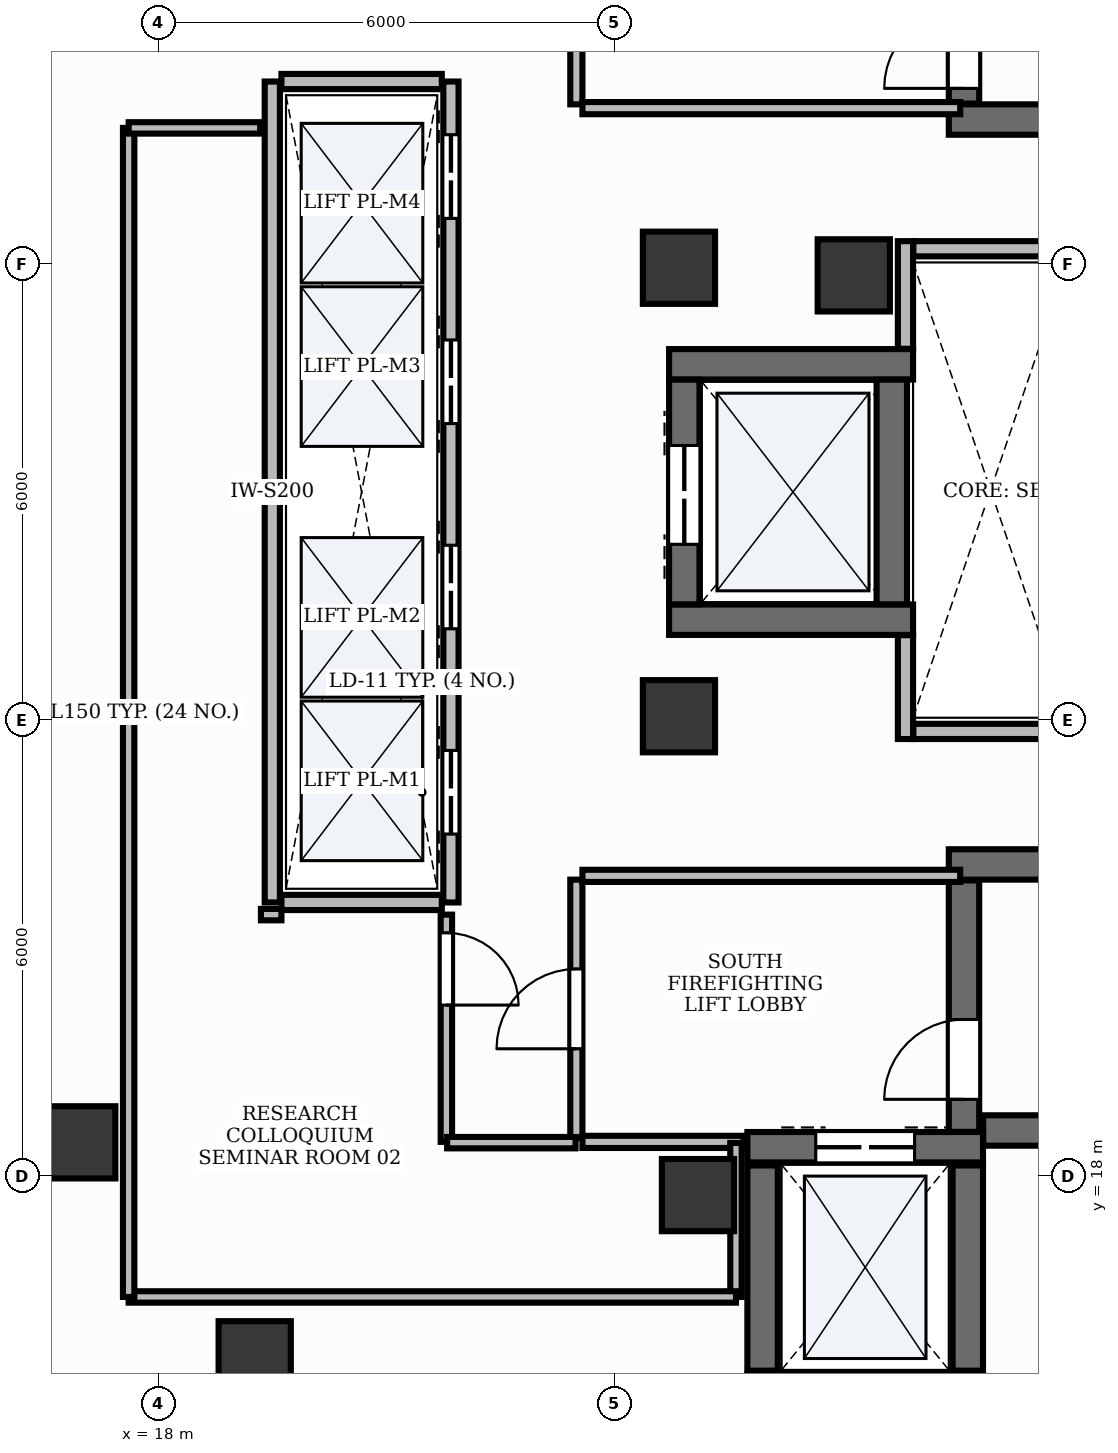
"""IFC4 building model, lengths in metres.
Left out: names, types, materials, properties, quantities, classifications, styles, units other than length and angle.
Written with IfcOpenShell. Run it as: python <this file> out.ifc"""

import sys

from ifc_helpers import new_model, si_unit, direction, frame, frame_2d, origin, origin_2d, place, context, subcontext, project, spatial, rectangle, extrude, element, fill, save


model = new_model("IFC4")
c1 = context("Model", 3, precision=1e-05, world=origin(), true_north=direction((0.0, 1.0)))
c2 = subcontext(c1, "Body", "Model", "MODEL_VIEW")
j1 = project(units=[si_unit("LENGTHUNIT", "METRE"), si_unit("PLANEANGLEUNIT", "RADIAN")], contexts=[c1])
p1 = place(None, origin())
s1 = spatial("IfcSite", under=j1, at=p1, CompositionType="ELEMENT")
p2 = place(p1, origin())
s2 = spatial("IfcBuilding", under=s1, at=p2, CompositionType="ELEMENT")
p3 = place(p2, frame((0.0, 0.0, 218.4)))
s3 = spatial("IfcBuildingStorey", under=s2, at=p3, CompositionType="ELEMENT", Elevation=218.4)
p4 = place(p3, frame((28.4, 31.9, 0.0), z_axis=(0.0, 0.0, 1.0), x_axis=(1.0, 0.0, 0.0)))
e1 = element("IfcWall", 1, at=p4, inside=s3, PredefinedType="SHEAR", context=c2, shape_type="SweptSolid", body=[
    extrude(rectangle(XDim=8.65, YDim=0.4, at=frame_2d((4.325, 0.0))), origin(), (0.0, 0.0, 1.0), 3.9),
])
p5 = place(p3, frame((28.6, 32.11, 0.0), z_axis=(0.0, 0.0, 1.0), x_axis=(0.0, 1.0, 0.0)))
e2 = element("IfcWall", 2, at=p5, inside=s3, PredefinedType="SHEAR", context=c2, shape_type="SweptSolid", body=[
    extrude(rectangle(XDim=3.308, YDim=0.4, at=frame_2d((1.654, 0.0))), origin(), (0.0, 0.0, 1.0), 3.9),
])
p6 = place(p5, frame((0.2, 0.0, 0.0)))
e3 = element("IfcOpeningElement", 3, at=p6, cuts=e2, PredefinedType="OPENING", context=c2, shape_type="SweptSolid", body=[
    extrude(rectangle(XDim=1.05, YDim=2.15, at=frame_2d((0.525, 1.075))), frame((0.0, 0.215, 0.0), z_axis=(0.0, -1.0, 0.0), x_axis=(1.0, 0.0, 0.0)), (0.0, 0.0, 1.0), 0.43),
])
p7 = place(p3, frame((28.852, 18.6, 0.0), z_axis=(0.0, 0.0, 1.0), x_axis=(1.0, 0.0, 0.0)))
e4 = element("IfcWall", 4, at=p7, inside=s3, PredefinedType="SHEAR", context=c2, shape_type="SweptSolid", body=[
    extrude(rectangle(XDim=8.198, YDim=0.4, at=frame_2d((4.099, 0.0))), origin(), (0.0, 0.0, 1.0), 3.9),
])
p8 = place(p3, frame((28.4, 22.1, 0.0), z_axis=(0.0, 0.0, 1.0), x_axis=(1.0, 0.0, 0.0)))
e5 = element("IfcWall", 5, at=p8, inside=s3, PredefinedType="SHEAR", context=c2, shape_type="SweptSolid", body=[
    extrude(rectangle(XDim=8.65, YDim=0.4, at=frame_2d((4.325, 0.0))), origin(), (0.0, 0.0, 1.0), 3.9),
])
p9 = place(p3, frame((28.6, 18.582, 0.0), z_axis=(0.0, 0.0, 1.0), x_axis=(0.0, 1.0, 0.0)))
e6 = element("IfcWall", 6, at=p9, inside=s3, PredefinedType="SHEAR", context=c2, shape_type="SweptSolid", body=[
    extrude(rectangle(XDim=3.308, YDim=0.4, at=frame_2d((1.654, 0.0))), origin(), (0.0, 0.0, 1.0), 3.9),
])
p10 = place(p9, frame((0.428, 0.0, 0.0)))
e7 = element("IfcOpeningElement", 7, at=p10, cuts=e6, PredefinedType="OPENING", context=c2, shape_type="SweptSolid", body=[
    extrude(rectangle(XDim=1.05, YDim=2.15, at=frame_2d((0.525, 1.075))), frame((0.0, 0.215, 0.0), z_axis=(0.0, -1.0, 0.0), x_axis=(1.0, 0.0, 0.0)), (0.0, 0.0, 1.0), 0.43),
])
p11 = place(p3, frame((25.75, 18.38, 0.0), z_axis=(0.0, 0.0, 1.0), x_axis=(1.0, 0.0, 0.0)))
e8 = element("IfcWall", 8, at=p11, inside=s3, PredefinedType="SHEAR", context=c2, shape_type="SweptSolid", body=[
    extrude(rectangle(XDim=3.1, YDim=0.4, at=frame_2d((1.55, 0.0))), origin(), (0.0, 0.0, 1.0), 3.9),
])
p12 = place(p11, frame((0.9, 0.0, 0.0)))
e9 = element("IfcOpeningElement", 9, at=p12, cuts=e8, PredefinedType="OPENING", context=c2, shape_type="SweptSolid", body=[
    extrude(rectangle(XDim=1.3, YDim=2.2, at=frame_2d((0.65, 1.1))), frame((0.0, 0.215, 0.0), z_axis=(0.0, -1.0, 0.0), x_axis=(1.0, 0.0, 0.0)), (0.0, 0.0, 1.0), 0.43),
])
for number, where, z_axis, x_axis in (
    (10, (25.95, 15.44, 0.0), (0.0, 0.0, 1.0), (0.0, 1.0, 0.0)),
    (11, (28.65, 15.44, 0.0), (0.0, 0.0, 1.0), (0.0, 1.0, 0.0)),
):
    element("IfcWall", number, at=place(p3, frame(where, z_axis=z_axis, x_axis=x_axis)), inside=s3, PredefinedType="SHEAR", context=c2, shape_type="SweptSolid", body=[
        extrude(rectangle(XDim=2.7, YDim=0.4, at=frame_2d((1.35, 0.0))), origin(), (0.0, 0.0, 1.0), 3.9),
    ])
for number, where, z_axis, x_axis in (
    (12, (24.72, 28.68, 0.0), (0.0, 0.0, 1.0), (1.0, 0.0, 0.0)),
    (13, (24.72, 25.32, 0.0), (0.0, 0.0, 1.0), (1.0, 0.0, 0.0)),
):
    element("IfcWall", number, at=place(p3, frame(where, z_axis=z_axis, x_axis=x_axis)), inside=s3, PredefinedType="SHEAR", context=c2, shape_type="SweptSolid", body=[
        extrude(rectangle(XDim=3.21, YDim=0.4, at=frame_2d((1.605, 0.0))), origin(), (0.0, 0.0, 1.0), 3.9),
    ])
p13 = place(p3, frame((24.92, 25.522, 0.0), z_axis=(0.0, 0.0, 1.0), x_axis=(0.0, 1.0, 0.0)))
e14 = element("IfcWall", 14, at=p13, inside=s3, PredefinedType="SHEAR", context=c2, shape_type="SweptSolid", body=[
    extrude(rectangle(XDim=2.956, YDim=0.4, at=frame_2d((1.478, 0.0))), origin(), (0.0, 0.0, 1.0), 3.9),
])
p14 = place(p13, frame((0.79, 0.0, 0.0)))
e15 = element("IfcOpeningElement", 15, at=p14, cuts=e14, PredefinedType="OPENING", context=c2, shape_type="SweptSolid", body=[
    extrude(rectangle(XDim=1.3, YDim=2.2, at=frame_2d((0.65, 1.1))), frame((0.0, 0.215, 0.0), z_axis=(0.0, -1.0, 0.0), x_axis=(1.0, 0.0, 0.0)), (0.0, 0.0, 1.0), 0.43),
])
p15 = place(p3, frame((27.65, 25.522, 0.0), z_axis=(0.0, 0.0, 1.0), x_axis=(0.0, 1.0, 0.0)))
e16 = element("IfcWall", 16, at=p15, inside=s3, PredefinedType="SHEAR", context=c2, shape_type="SweptSolid", body=[
    extrude(rectangle(XDim=2.956, YDim=0.4, at=frame_2d((1.478, 0.0))), origin(), (0.0, 0.0, 1.0), 3.9),
])
for number, where, z_axis, x_axis in (
    (17, (24.85, 29.95, -0.0), (0.0, 0.0, 1.0), (1.0, 0.0, 0.0)),
    (18, (27.15, 29.85, -0.0), (0.0, 0.0, 1.0), (1.0, 0.0, 0.0)),
    (19, (24.85, 24.05, -0.0), (0.0, 0.0, 1.0), (1.0, 0.0, 0.0)),
    (20, (25.1, 17.75, -0.0), (0.0, 0.0, 1.0), (1.0, 0.0, 0.0)),
):
    element("IfcColumn", number, at=place(p3, frame(where, z_axis=z_axis, x_axis=x_axis)), inside=s3, PredefinedType="PILASTER", context=c2, shape_type="SweptSolid", body=[
        extrude(rectangle(XDim=0.95, YDim=0.95, at=origin_2d()), origin(), (0.0, 0.0, 1.0), 3.901),
    ])
for number, where, z_axis, x_axis in (
    (21, (16.96, 18.444, -0.0), (0.0, 0.0, 1.0), (1.0, 0.0, 0.0)),
    (22, (19.268, 15.616, -0.0), (0.0, 0.0, 1.0), (1.0, 0.0, 0.0)),
):
    element("IfcColumn", number, at=place(p3, frame(where, z_axis=z_axis, x_axis=x_axis)), inside=s3, PredefinedType="COLUMN", context=c2, shape_type="SweptSolid", body=[
        extrude(rectangle(XDim=0.95, YDim=0.95, at=origin_2d()), origin(), (0.0, 0.0, 1.0), 3.901),
    ])
p16 = place(p3, frame((19.5, 21.6, 0.0), z_axis=(0.0, 0.0, 1.0), x_axis=(0.0, 1.0, 0.0)))
e23 = element("IfcWall", 23, at=p16, inside=s3, PredefinedType="PARTITIONING", context=c2, shape_type="SweptSolid", body=[
    extrude(rectangle(XDim=10.8, YDim=0.2, at=frame_2d((5.4, 0.0))), origin(), (0.0, 0.0, 1.0), 2.91),
])
p17 = place(p3, frame((21.85, 21.6, 0.0), z_axis=(0.0, 0.0, 1.0), x_axis=(0.0, 1.0, 0.0)))
e24 = element("IfcWall", 24, at=p17, inside=s3, PredefinedType="PARTITIONING", context=c2, shape_type="SweptSolid", body=[
    extrude(rectangle(XDim=10.8, YDim=0.2, at=frame_2d((5.4, 0.0))), origin(), (0.0, 0.0, 1.0), 2.91),
])
p18 = place(p17, frame((0.9, 0.0, 0.0)))
e25 = element("IfcOpeningElement", 25, at=p18, cuts=e24, PredefinedType="OPENING", context=c2, shape_type="SweptSolid", body=[
    extrude(rectangle(XDim=1.1, YDim=2.2, at=frame_2d((0.55, 1.1))), frame((0.0, 0.115, 0.0), z_axis=(0.0, -1.0, 0.0), x_axis=(1.0, 0.0, 0.0)), (0.0, 0.0, 1.0), 0.23),
])
p19 = place(p17, frame((3.6, 0.0, 0.0)))
e26 = element("IfcOpeningElement", 26, at=p19, cuts=e24, PredefinedType="OPENING", context=c2, shape_type="SweptSolid", body=[
    extrude(rectangle(XDim=1.1, YDim=2.2, at=frame_2d((0.55, 1.1))), frame((0.0, 0.115, 0.0), z_axis=(0.0, -1.0, 0.0), x_axis=(1.0, 0.0, 0.0)), (0.0, 0.0, 1.0), 0.23),
])
p20 = place(p17, frame((6.3, 0.0, 0.0)))
e27 = element("IfcOpeningElement", 27, at=p20, cuts=e24, PredefinedType="OPENING", context=c2, shape_type="SweptSolid", body=[
    extrude(rectangle(XDim=1.1, YDim=2.2, at=frame_2d((0.55, 1.1))), frame((0.0, 0.115, 0.0), z_axis=(0.0, -1.0, 0.0), x_axis=(1.0, 0.0, 0.0)), (0.0, 0.0, 1.0), 0.23),
])
p21 = place(p17, frame((9.0, 0.0, 0.0)))
e28 = element("IfcOpeningElement", 28, at=p21, cuts=e24, PredefinedType="OPENING", context=c2, shape_type="SweptSolid", body=[
    extrude(rectangle(XDim=1.1, YDim=2.2, at=frame_2d((0.55, 1.1))), frame((0.0, 0.115, 0.0), z_axis=(0.0, -1.0, 0.0), x_axis=(1.0, 0.0, 0.0)), (0.0, 0.0, 1.0), 0.23),
])
for number, where, z_axis, x_axis in (
    (29, (19.62, 21.6, 0.0), (0.0, 0.0, 1.0), (1.0, 0.0, 0.0)),
    (30, (19.62, 32.4, 0.0), (0.0, 0.0, 1.0), (1.0, 0.0, 0.0)),
):
    element("IfcWall", number, at=place(p3, frame(where, z_axis=z_axis, x_axis=x_axis)), inside=s3, PredefinedType="PARTITIONING", context=c2, shape_type="SweptSolid", body=[
        extrude(rectangle(XDim=2.11, YDim=0.2, at=frame_2d((1.055, 0.0))), origin(), (0.0, 0.0, 1.0), 2.91),
    ])
p22 = place(p3, frame((27.83, 23.75, 0.0), z_axis=(0.0, 0.0, 1.0), x_axis=(0.0, 1.0, 0.0)))
e31 = element("IfcWall", 31, at=p22, inside=s3, PredefinedType="PARTITIONING", context=c2, shape_type="SweptSolid", body=[
    extrude(rectangle(XDim=1.366, YDim=0.2, at=frame_2d((0.683, 0.0))), origin(), (0.0, 0.0, 1.0), 2.91),
])
p23 = place(p3, frame((27.83, 28.884, 0.0), z_axis=(0.0, 0.0, 1.0), x_axis=(0.0, 1.0, 0.0)))
e32 = element("IfcWall", 32, at=p23, inside=s3, PredefinedType="PARTITIONING", context=c2, shape_type="SweptSolid", body=[
    extrude(rectangle(XDim=1.416, YDim=0.2, at=frame_2d((0.708, 0.0))), origin(), (0.0, 0.0, 1.0), 2.91),
])
for number, where, z_axis, x_axis in (
    (33, (27.934, 23.85, 0.0), (0.0, 0.0, 1.0), (1.0, 0.0, 0.0)),
    (34, (27.934, 30.2, 0.0), (0.0, 0.0, 1.0), (1.0, 0.0, 0.0)),
):
    element("IfcWall", number, at=place(p3, frame(where, z_axis=z_axis, x_axis=x_axis)), inside=s3, PredefinedType="PARTITIONING", context=c2, shape_type="SweptSolid", body=[
        extrude(rectangle(XDim=2.096, YDim=0.2, at=frame_2d((1.048, 0.0))), origin(), (0.0, 0.0, 1.0), 2.91),
    ])
p24 = place(p3, frame((23.5, 32.1, 0.0), z_axis=(0.0, 0.0, 1.0), x_axis=(0.0, 1.0, 0.0)))
e35 = element("IfcWall", 35, at=p24, inside=s3, PredefinedType="PARTITIONING", context=c2, shape_type="SweptSolid", body=[
    extrude(rectangle(XDim=3.4, YDim=0.16, at=frame_2d((1.7, 0.0))), origin(), (0.0, 0.0, 1.0), 2.91),
])
p25 = place(p24, frame((1.175, 0.0, 0.0)))
e36 = element("IfcOpeningElement", 36, at=p25, cuts=e35, PredefinedType="OPENING", context=c2, shape_type="SweptSolid", body=[
    extrude(rectangle(XDim=1.05, YDim=2.15, at=frame_2d((0.525, 1.075))), frame((0.0, 0.095, 0.0), z_axis=(0.0, -1.0, 0.0), x_axis=(1.0, 0.0, 0.0)), (0.0, 0.0, 1.0), 0.19),
])
p26 = place(p3, frame((23.5, 18.5, 0.0), z_axis=(0.0, 0.0, 1.0), x_axis=(0.0, 1.0, 0.0)))
e37 = element("IfcWall", 37, at=p26, inside=s3, PredefinedType="PARTITIONING", context=c2, shape_type="SweptSolid", body=[
    extrude(rectangle(XDim=3.4, YDim=0.16, at=frame_2d((1.7, 0.0))), origin(), (0.0, 0.0, 1.0), 2.91),
])
p27 = place(p26, frame((1.175, 0.0, 0.0)))
e38 = element("IfcOpeningElement", 38, at=p27, cuts=e37, PredefinedType="OPENING", context=c2, shape_type="SweptSolid", body=[
    extrude(rectangle(XDim=1.05, YDim=2.15, at=frame_2d((0.525, 1.075))), frame((0.0, 0.095, 0.0), z_axis=(0.0, -1.0, 0.0), x_axis=(1.0, 0.0, 0.0)), (0.0, 0.0, 1.0), 0.19),
])
for number, where, z_axis, x_axis in (
    (39, (23.58, 32.05, 0.0), (0.0, 0.0, 1.0), (1.0, 0.0, 0.0)),
    (40, (23.58, 21.95, 0.0), (0.0, 0.0, 1.0), (1.0, 0.0, 0.0)),
):
    element("IfcWall", number, at=place(p3, frame(where, z_axis=z_axis, x_axis=x_axis)), inside=s3, PredefinedType="PARTITIONING", context=c2, shape_type="SweptSolid", body=[
        extrude(rectangle(XDim=4.97, YDim=0.16, at=frame_2d((2.485, 0.0))), origin(), (0.0, 0.0, 1.0), 2.91),
    ])
p28 = place(p3, frame((23.58, 18.45, 0.0), z_axis=(0.0, 0.0, 1.0), x_axis=(1.0, 0.0, 0.0)))
e41 = element("IfcWall", 41, at=p28, inside=s3, PredefinedType="PARTITIONING", context=c2, shape_type="SweptSolid", body=[
    extrude(rectangle(XDim=2.12, YDim=0.16, at=frame_2d((1.06, 0.0))), origin(), (0.0, 0.0, 1.0), 2.91),
])
p29 = place(p3, frame((21.79, 21.44, 0.0), z_axis=(0.0, 0.0, 1.0), x_axis=(0.0, -1.0, 0.0)))
e42 = element("IfcWall", 42, at=p29, inside=s3, PredefinedType="PARTITIONING", context=c2, shape_type="SweptSolid", body=[
    extrude(rectangle(XDim=2.99, YDim=0.15, at=frame_2d((1.495, 0.0))), origin(), (0.0, 0.0, 1.0), 2.91),
])
p30 = place(p29, frame((0.24, 0.0, 0.0)))
e43 = element("IfcOpeningElement", 43, at=p30, cuts=e42, PredefinedType="OPENING", context=c2, shape_type="SweptSolid", body=[
    extrude(rectangle(XDim=0.95, YDim=2.15, at=frame_2d((0.475, 1.075))), frame((0.0, 0.09, 0.0), z_axis=(0.0, -1.0, 0.0), x_axis=(1.0, 0.0, 0.0)), (0.0, 0.0, 1.0), 0.18),
])
p31 = place(p3, frame((19.35, 21.44, 0.0), z_axis=(0.0, 0.0, 1.0), x_axis=(1.0, 0.0, 0.0)))
e44 = element("IfcWall", 44, at=p31, inside=s3, PredefinedType="PARTITIONING", context=c2, shape_type="SweptSolid", body=[
    extrude(rectangle(XDim=0.27, YDim=0.15, at=frame_2d((0.135, 0.0))), origin(), (0.0, 0.0, 1.0), 2.91),
])
p32 = place(p3, frame((21.8, 18.44, 0.0), z_axis=(0.0, 0.0, 1.0), x_axis=(1.0, 0.0, 0.0)))
e45 = element("IfcWall", 45, at=p32, inside=s3, PredefinedType="PARTITIONING", context=c2, shape_type="SweptSolid", body=[
    extrude(rectangle(XDim=1.69, YDim=0.15, at=frame_2d((0.845, 0.0))), origin(), (0.0, 0.0, 1.0), 2.91),
])
p33 = place(p3, frame((25.6, 18.436, 0.0), z_axis=(0.0, 0.0, 1.0), x_axis=(0.0, -1.0, 0.0)))
e46 = element("IfcWall", 46, at=p33, inside=s3, PredefinedType="PARTITIONING", context=c2, shape_type="SweptSolid", body=[
    extrude(rectangle(XDim=2.026, YDim=0.15, at=frame_2d((1.013, 0.0))), origin(), (0.0, 0.0, 1.0), 2.91),
])
p34 = place(p3, frame((25.6, 16.41, 0.0), z_axis=(0.0, 0.0, 1.0), x_axis=(-1.0, 0.0, 0.0)))
e47 = element("IfcWall", 47, at=p34, inside=s3, PredefinedType="PARTITIONING", context=c2, shape_type="SweptSolid", body=[
    extrude(rectangle(XDim=7.99, YDim=0.15, at=frame_2d((3.995, 0.0))), origin(), (0.0, 0.0, 1.0), 2.91),
])
p35 = place(p3, frame((17.61, 16.41, 0.0), z_axis=(0.0, 0.0, 1.0), x_axis=(0.0, 1.0, 0.0)))
e48 = element("IfcWall", 48, at=p35, inside=s3, PredefinedType="PARTITIONING", context=c2, shape_type="SweptSolid", body=[
    extrude(rectangle(XDim=15.38, YDim=0.15, at=frame_2d((7.69, 0.0))), origin(), (0.0, 0.0, 1.0), 2.91),
])
p36 = place(p3, frame((17.61, 31.79, 0.0), z_axis=(0.0, 0.0, 1.0), x_axis=(1.0, 0.0, 0.0)))
e49 = element("IfcWall", 49, at=p36, inside=s3, PredefinedType="PARTITIONING", context=c2, shape_type="SweptSolid", body=[
    extrude(rectangle(XDim=1.73, YDim=0.15, at=frame_2d((0.865, 0.0))), origin(), (0.0, 0.0, 1.0), 2.91),
])
p37 = place(p6, origin())
e50 = element("IfcDoor", 50, at=p37, inside=s3, OperationType="SINGLE_SWING_LEFT", PredefinedType="DOOR", context=c2, shape_type="SweptSolid", body=[
    extrude(rectangle(XDim=1.05, YDim=2.15, at=frame_2d((0.525, 1.075))), frame((0.0, 0.025, 0.0), z_axis=(0.0, -1.0, 0.0), x_axis=(1.0, 0.0, 0.0)), (0.0, 0.0, 1.0), 0.05),
])
fill(e3, e50)
p38 = place(p10, origin())
e51 = element("IfcDoor", 51, at=p38, inside=s3, OperationType="SINGLE_SWING_LEFT", PredefinedType="DOOR", context=c2, shape_type="SweptSolid", body=[
    extrude(rectangle(XDim=1.05, YDim=2.15, at=frame_2d((0.525, 1.075))), frame((0.0, 0.025, 0.0), z_axis=(0.0, -1.0, 0.0), x_axis=(1.0, 0.0, 0.0)), (0.0, 0.0, 1.0), 0.05),
])
fill(e7, e51)
p39 = place(p18, origin())
e52 = element("IfcDoor", 52, at=p39, inside=s3, OperationType="DOUBLE_DOOR_SLIDING", PredefinedType="DOOR", context=c2, shape_type="SweptSolid", body=[
    extrude(rectangle(XDim=1.1, YDim=2.2, at=frame_2d((0.55, 1.1))), frame((0.0, 0.025, 0.0), z_axis=(0.0, -1.0, 0.0), x_axis=(1.0, 0.0, 0.0)), (0.0, 0.0, 1.0), 0.05),
])
fill(e25, e52)
p40 = place(p19, origin())
e53 = element("IfcDoor", 53, at=p40, inside=s3, OperationType="DOUBLE_DOOR_SLIDING", PredefinedType="DOOR", context=c2, shape_type="SweptSolid", body=[
    extrude(rectangle(XDim=1.1, YDim=2.2, at=frame_2d((0.55, 1.1))), frame((0.0, 0.025, 0.0), z_axis=(0.0, -1.0, 0.0), x_axis=(1.0, 0.0, 0.0)), (0.0, 0.0, 1.0), 0.05),
])
fill(e26, e53)
p41 = place(p20, origin())
e54 = element("IfcDoor", 54, at=p41, inside=s3, OperationType="DOUBLE_DOOR_SLIDING", PredefinedType="DOOR", context=c2, shape_type="SweptSolid", body=[
    extrude(rectangle(XDim=1.1, YDim=2.2, at=frame_2d((0.55, 1.1))), frame((0.0, 0.025, 0.0), z_axis=(0.0, -1.0, 0.0), x_axis=(1.0, 0.0, 0.0)), (0.0, 0.0, 1.0), 0.05),
])
fill(e27, e54)
p42 = place(p21, origin())
e55 = element("IfcDoor", 55, at=p42, inside=s3, OperationType="DOUBLE_DOOR_SLIDING", PredefinedType="DOOR", context=c2, shape_type="SweptSolid", body=[
    extrude(rectangle(XDim=1.1, YDim=2.2, at=frame_2d((0.55, 1.1))), frame((0.0, 0.025, 0.0), z_axis=(0.0, -1.0, 0.0), x_axis=(1.0, 0.0, 0.0)), (0.0, 0.0, 1.0), 0.05),
])
fill(e28, e55)
p43 = place(p12, origin())
e56 = element("IfcDoor", 56, at=p43, inside=s3, OperationType="DOUBLE_DOOR_SLIDING", PredefinedType="DOOR", context=c2, shape_type="SweptSolid", body=[
    extrude(rectangle(XDim=1.3, YDim=2.2, at=frame_2d((0.65, 1.1))), frame((0.0, 0.025, 0.0), z_axis=(0.0, -1.0, 0.0), x_axis=(1.0, 0.0, 0.0)), (0.0, 0.0, 1.0), 0.05),
])
fill(e9, e56)
p44 = place(p14, origin())
e57 = element("IfcDoor", 57, at=p44, inside=s3, OperationType="DOUBLE_DOOR_SLIDING", PredefinedType="DOOR", context=c2, shape_type="SweptSolid", body=[
    extrude(rectangle(XDim=1.3, YDim=2.2, at=frame_2d((0.65, 1.1))), frame((0.0, 0.025, 0.0), z_axis=(0.0, -1.0, 0.0), x_axis=(1.0, 0.0, 0.0)), (0.0, 0.0, 1.0), 0.05),
])
fill(e15, e57)
p45 = place(p27, origin())
e58 = element("IfcDoor", 58, at=p45, inside=s3, OperationType="SINGLE_SWING_LEFT", PredefinedType="DOOR", context=c2, shape_type="SweptSolid", body=[
    extrude(rectangle(XDim=1.05, YDim=2.15, at=frame_2d((0.525, 1.075))), frame((0.0, 0.025, 0.0), z_axis=(0.0, -1.0, 0.0), x_axis=(1.0, 0.0, 0.0)), (0.0, 0.0, 1.0), 0.05),
])
fill(e38, e58)
p46 = place(p30, origin())
e59 = element("IfcDoor", 59, at=p46, inside=s3, OperationType="SINGLE_SWING_RIGHT", PredefinedType="DOOR", context=c2, shape_type="SweptSolid", body=[
    extrude(rectangle(XDim=0.95, YDim=2.15, at=frame_2d((0.475, 1.075))), frame((0.0, 0.025, 0.0), z_axis=(0.0, -1.0, 0.0), x_axis=(1.0, 0.0, 0.0)), (0.0, 0.0, 1.0), 0.05),
])
fill(e43, e59)
save(model, sys.argv[1])
